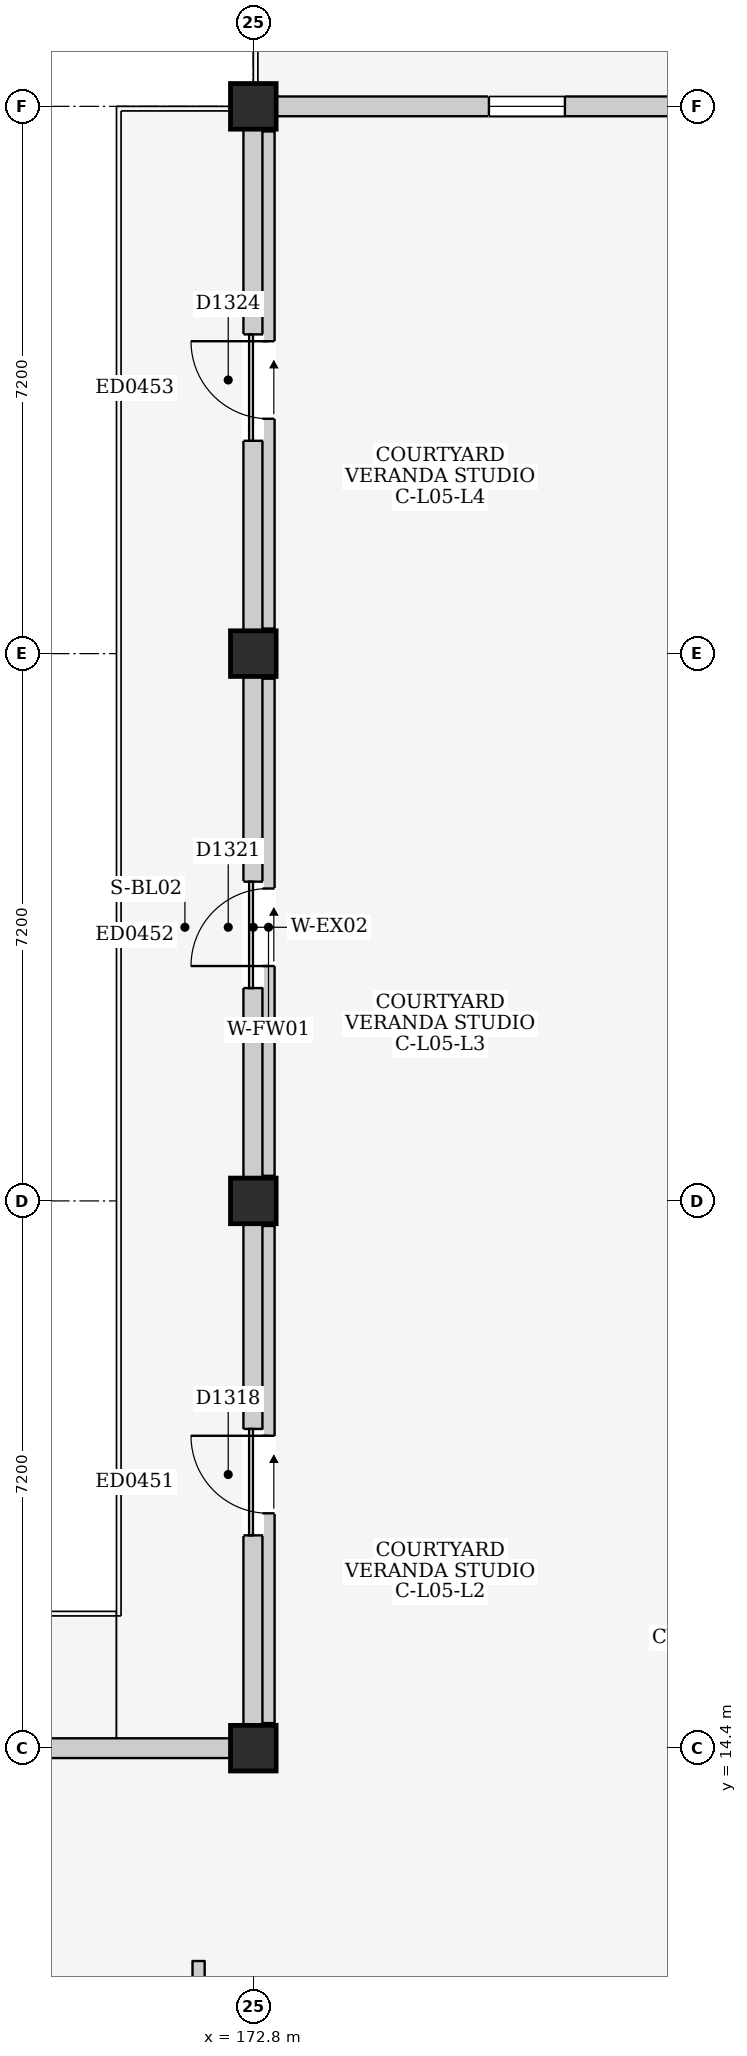
"""IFC4 building model, lengths in metres.
Left out: names, types, materials, properties, quantities, classifications, styles, units other than length and angle.
Written with IfcOpenShell. Run it as: python <this file> out.ifc"""

import sys

from ifc_helpers import new_model, si_unit, direction, frame, frame_2d, origin, origin_2d, place, context, subcontext, project, spatial, rectangle, extrude, element, fill, save


model = new_model("IFC4")
c1 = context("Model", 3, precision=1e-05, world=origin(), true_north=direction((0.0, 1.0)))
c2 = subcontext(c1, "Body", "Model", "MODEL_VIEW")
j1 = project(units=[si_unit("LENGTHUNIT", "METRE"), si_unit("PLANEANGLEUNIT", "RADIAN")], contexts=[c1])
p1 = place(None, origin())
s1 = spatial("IfcSite", under=j1, at=p1, CompositionType="ELEMENT")
p2 = place(p1, origin())
s2 = spatial("IfcBuilding", under=s1, at=p2, CompositionType="ELEMENT")
p3 = place(p2, frame((0.0, 0.0, 18.6)))
s3 = spatial("IfcBuildingStorey", under=s2, at=p3, CompositionType="ELEMENT", Elevation=18.6)
for number, where, z_axis, x_axis in (
    (1, (172.8, 14.4, 0.0), (0.0, 0.0, 1.0), (1.0, 0.0, 0.0)),
    (2, (172.8, 21.6, 0.0), (0.0, 0.0, 1.0), (1.0, 0.0, 0.0)),
    (3, (172.8, 28.8, 0.0), (0.0, 0.0, 1.0), (1.0, 0.0, 0.0)),
    (4, (172.8, 36.0, 0.0), (0.0, 0.0, 1.0), (1.0, 0.0, 0.0)),
):
    element("IfcColumn", number, at=place(p3, frame(where, z_axis=z_axis, x_axis=x_axis)), inside=s3, PredefinedType="COLUMN", context=c2, shape_type="SweptSolid", body=[
        extrude(rectangle(XDim=0.6, YDim=0.6, at=origin_2d()), origin(), (0.0, 0.0, 1.0), 3.3),
    ])
p4 = place(p3, frame((165.9, 14.4, 0.0), z_axis=(0.0, 0.0, 1.0), x_axis=(1.0, 0.0, 0.0)))
e5 = element("IfcWall", 5, at=p4, inside=s3, PredefinedType="ELEMENTEDWALL", context=c2, shape_type="SweptSolid", body=[
    extrude(rectangle(XDim=6.6, YDim=0.26, at=frame_2d((3.3, 0.0))), origin(), (0.0, 0.0, 1.0), 2.445),
])
p5 = place(p4, frame((2.8, 0.0, 1.2)))
e6 = element("IfcOpeningElement", 6, at=p5, cuts=e5, PredefinedType="OPENING", context=c2, shape_type="SweptSolid", body=[
    extrude(rectangle(XDim=1.0, YDim=0.9, at=frame_2d((0.5, 0.45))), frame((0.0, 0.145, 0.0), z_axis=(0.0, -1.0, 0.0), x_axis=(1.0, 0.0, 0.0)), (0.0, 0.0, 1.0), 0.29),
])
p6 = place(p3, frame((172.8, 14.7, 0.0), z_axis=(0.0, 0.0, 1.0), x_axis=(0.0, 1.0, 0.0)))
e7 = element("IfcWall", 7, at=p6, inside=s3, PredefinedType="ELEMENTEDWALL", context=c2, shape_type="SweptSolid", body=[
    extrude(rectangle(XDim=6.6, YDim=0.26, at=frame_2d((3.3, 0.0))), origin(), (0.0, 0.0, 1.0), 2.545),
])
p7 = place(p6, frame((2.5, 0.0, 0.0)))
e8 = element("IfcOpeningElement", 8, at=p7, cuts=e7, PredefinedType="OPENING", context=c2, shape_type="SweptSolid", body=[
    extrude(rectangle(XDim=1.4, YDim=2.1, at=frame_2d((0.7, 1.05))), frame((0.0, 0.145, 0.0), z_axis=(0.0, -1.0, 0.0), x_axis=(1.0, 0.0, 0.0)), (0.0, 0.0, 1.0), 0.29),
])
p8 = place(p3, frame((172.8, 21.9, 0.0), z_axis=(0.0, 0.0, 1.0), x_axis=(0.0, 1.0, 0.0)))
e9 = element("IfcWall", 9, at=p8, inside=s3, PredefinedType="ELEMENTEDWALL", context=c2, shape_type="SweptSolid", body=[
    extrude(rectangle(XDim=6.6, YDim=0.26, at=frame_2d((3.3, 0.0))), origin(), (0.0, 0.0, 1.0), 2.545),
])
p9 = place(p8, frame((2.5, 0.0, 0.0)))
e10 = element("IfcOpeningElement", 10, at=p9, cuts=e9, PredefinedType="OPENING", context=c2, shape_type="SweptSolid", body=[
    extrude(rectangle(XDim=1.4, YDim=2.1, at=frame_2d((0.7, 1.05))), frame((0.0, 0.145, 0.0), z_axis=(0.0, -1.0, 0.0), x_axis=(1.0, 0.0, 0.0)), (0.0, 0.0, 1.0), 0.29),
])
p10 = place(p3, frame((173.1, 36.0, 0.0), z_axis=(0.0, 0.0, 1.0), x_axis=(1.0, 0.0, 0.0)))
e11 = element("IfcWall", 11, at=p10, inside=s3, PredefinedType="ELEMENTEDWALL", context=c2, shape_type="SweptSolid", body=[
    extrude(rectangle(XDim=6.6, YDim=0.26, at=frame_2d((3.3, 0.0))), origin(), (0.0, 0.0, 1.0), 2.445),
])
p11 = place(p10, frame((2.8, 0.0, 1.1)))
e12 = element("IfcOpeningElement", 12, at=p11, cuts=e11, PredefinedType="OPENING", context=c2, shape_type="SweptSolid", body=[
    extrude(rectangle(XDim=1.0, YDim=0.9, at=frame_2d((0.5, 0.45))), frame((0.0, 0.145, 0.0), z_axis=(0.0, -1.0, 0.0), x_axis=(1.0, 0.0, 0.0)), (0.0, 0.0, 1.0), 0.29),
])
p12 = place(p3, frame((172.8, 29.1, 0.0), z_axis=(0.0, 0.0, 1.0), x_axis=(0.0, 1.0, 0.0)))
e13 = element("IfcWall", 13, at=p12, inside=s3, PredefinedType="ELEMENTEDWALL", context=c2, shape_type="SweptSolid", body=[
    extrude(rectangle(XDim=6.6, YDim=0.26, at=frame_2d((3.3, 0.0))), origin(), (0.0, 0.0, 1.0), 2.545),
])
p13 = place(p12, frame((2.5, 0.0, 0.0)))
e14 = element("IfcOpeningElement", 14, at=p13, cuts=e13, PredefinedType="OPENING", context=c2, shape_type="SweptSolid", body=[
    extrude(rectangle(XDim=1.4, YDim=2.1, at=frame_2d((0.7, 1.05))), frame((0.0, 0.145, 0.0), z_axis=(0.0, -1.0, 0.0), x_axis=(1.0, 0.0, 0.0)), (0.0, 0.0, 1.0), 0.29),
])
p14 = place(p3, frame((172.08, 7.28, 0.0), z_axis=(0.0, 0.0, 1.0), x_axis=(0.0, 1.0, 0.0)))
e15 = element("IfcWall", 15, at=p14, inside=s3, PredefinedType="PARTITIONING", context=c2, shape_type="SweptSolid", body=[
    extrude(rectangle(XDim=4.32, YDim=0.16, at=frame_2d((2.16, 0.0))), origin(), (0.0, 0.0, 1.0), 3.06),
])
p15 = place(p14, frame((0.72, 0.0, 0.0)))
e16 = element("IfcOpeningElement", 16, at=p15, cuts=e15, PredefinedType="OPENING", context=c2, shape_type="SweptSolid", body=[
    extrude(rectangle(XDim=1.2, YDim=2.2, at=frame_2d((0.6, 1.1))), frame((0.0, 0.095, 0.0), z_axis=(0.0, -1.0, 0.0), x_axis=(1.0, 0.0, 0.0)), (0.0, 0.0, 1.0), 0.19),
])
p16 = place(p3, frame((173.0, 14.73, 0.0), z_axis=(0.0, 0.0, 1.0), x_axis=(0.0, 1.0, 0.0)))
e17 = element("IfcWall", 17, at=p16, inside=s3, PredefinedType="PARTITIONING", context=c2, shape_type="SweptSolid", body=[
    extrude(rectangle(XDim=6.54, YDim=0.16, at=frame_2d((3.27, 0.0))), origin(), (0.0, 0.0, 1.0), 3.06),
])
p17 = place(p16, frame((2.76, 0.0, 0.0)))
e18 = element("IfcOpeningElement", 18, at=p17, cuts=e17, PredefinedType="OPENING", context=c2, shape_type="SweptSolid", body=[
    extrude(rectangle(XDim=1.02, YDim=2.18, at=frame_2d((0.51, 1.09))), frame((0.0, 0.095, 0.0), z_axis=(0.0, -1.0, 0.0), x_axis=(1.0, 0.0, 0.0)), (0.0, 0.0, 1.0), 0.19),
])
p18 = place(p3, frame((173.0, 21.93, 0.0), z_axis=(0.0, 0.0, 1.0), x_axis=(0.0, 1.0, 0.0)))
e19 = element("IfcWall", 19, at=p18, inside=s3, PredefinedType="PARTITIONING", context=c2, shape_type="SweptSolid", body=[
    extrude(rectangle(XDim=6.54, YDim=0.16, at=frame_2d((3.27, 0.0))), origin(), (0.0, 0.0, 1.0), 3.06),
])
p19 = place(p18, frame((2.76, 0.0, 0.0)))
e20 = element("IfcOpeningElement", 20, at=p19, cuts=e19, PredefinedType="OPENING", context=c2, shape_type="SweptSolid", body=[
    extrude(rectangle(XDim=1.02, YDim=2.18, at=frame_2d((0.51, 1.09))), frame((0.0, 0.095, 0.0), z_axis=(0.0, -1.0, 0.0), x_axis=(1.0, 0.0, 0.0)), (0.0, 0.0, 1.0), 0.19),
])
p20 = place(p3, frame((173.0, 29.13, 0.0), z_axis=(0.0, 0.0, 1.0), x_axis=(0.0, 1.0, 0.0)))
e21 = element("IfcWall", 21, at=p20, inside=s3, PredefinedType="PARTITIONING", context=c2, shape_type="SweptSolid", body=[
    extrude(rectangle(XDim=6.54, YDim=0.16, at=frame_2d((3.27, 0.0))), origin(), (0.0, 0.0, 1.0), 3.06),
])
p21 = place(p20, frame((2.76, 0.0, 0.0)))
e22 = element("IfcOpeningElement", 22, at=p21, cuts=e21, PredefinedType="OPENING", context=c2, shape_type="SweptSolid", body=[
    extrude(rectangle(XDim=1.02, YDim=2.18, at=frame_2d((0.51, 1.09))), frame((0.0, 0.095, 0.0), z_axis=(0.0, -1.0, 0.0), x_axis=(1.0, 0.0, 0.0)), (0.0, 0.0, 1.0), 0.19),
])
p22 = place(p7, frame((1.4, 0.0, 0.0), z_axis=(0.0, 0.0, 1.0), x_axis=(-1.0, 0.0, 0.0)))
e23 = element("IfcDoor", 23, at=p22, inside=s3, OperationType="SLIDING_TO_RIGHT", PredefinedType="DOOR", context=c2, shape_type="SweptSolid", body=[
    extrude(rectangle(XDim=1.4, YDim=2.1, at=frame_2d((0.7, 1.05))), frame((0.0, 0.025, 0.0), z_axis=(0.0, -1.0, 0.0), x_axis=(1.0, 0.0, 0.0)), (0.0, 0.0, 1.0), 0.05),
])
fill(e8, e23)
p23 = place(p9, frame((1.4, 0.0, 0.0), z_axis=(0.0, 0.0, 1.0), x_axis=(-1.0, 0.0, 0.0)))
e24 = element("IfcDoor", 24, at=p23, inside=s3, OperationType="SLIDING_TO_RIGHT", PredefinedType="DOOR", context=c2, shape_type="SweptSolid", body=[
    extrude(rectangle(XDim=1.4, YDim=2.1, at=frame_2d((0.7, 1.05))), frame((0.0, 0.025, 0.0), z_axis=(0.0, -1.0, 0.0), x_axis=(1.0, 0.0, 0.0)), (0.0, 0.0, 1.0), 0.05),
])
fill(e10, e24)
p24 = place(p11, origin())
e25 = element("IfcWindow", 25, at=p24, inside=s3, PartitioningType="SINGLE_PANEL", PredefinedType="WINDOW", context=c2, shape_type="SweptSolid", body=[
    extrude(rectangle(XDim=1.0, YDim=0.9, at=frame_2d((0.5, 0.45))), frame((0.0, 0.03, 0.0), z_axis=(0.0, -1.0, 0.0), x_axis=(1.0, 0.0, 0.0)), (0.0, 0.0, 1.0), 0.06),
])
fill(e12, e25)
p25 = place(p13, frame((1.4, 0.0, 0.0), z_axis=(0.0, 0.0, 1.0), x_axis=(-1.0, 0.0, 0.0)))
e26 = element("IfcDoor", 26, at=p25, inside=s3, OperationType="SLIDING_TO_RIGHT", PredefinedType="DOOR", context=c2, shape_type="SweptSolid", body=[
    extrude(rectangle(XDim=1.4, YDim=2.1, at=frame_2d((0.7, 1.05))), frame((0.0, 0.025, 0.0), z_axis=(0.0, -1.0, 0.0), x_axis=(1.0, 0.0, 0.0)), (0.0, 0.0, 1.0), 0.05),
])
fill(e14, e26)
p26 = place(p17, origin())
e27 = element("IfcDoor", 27, at=p26, inside=s3, OperationType="SINGLE_SWING_RIGHT", PredefinedType="DOOR", context=c2, shape_type="SweptSolid", body=[
    extrude(rectangle(XDim=1.02, YDim=2.18, at=frame_2d((0.51, 1.09))), frame((0.0, 0.025, 0.0), z_axis=(0.0, -1.0, 0.0), x_axis=(1.0, 0.0, 0.0)), (0.0, 0.0, 1.0), 0.05),
])
fill(e18, e27)
p27 = place(p19, origin())
e28 = element("IfcDoor", 28, at=p27, inside=s3, OperationType="SINGLE_SWING_LEFT", PredefinedType="DOOR", context=c2, shape_type="SweptSolid", body=[
    extrude(rectangle(XDim=1.02, YDim=2.18, at=frame_2d((0.51, 1.09))), frame((0.0, 0.025, 0.0), z_axis=(0.0, -1.0, 0.0), x_axis=(1.0, 0.0, 0.0)), (0.0, 0.0, 1.0), 0.05),
])
fill(e20, e28)
p28 = place(p21, origin())
e29 = element("IfcDoor", 29, at=p28, inside=s3, OperationType="SINGLE_SWING_RIGHT", PredefinedType="DOOR", context=c2, shape_type="SweptSolid", body=[
    extrude(rectangle(XDim=1.02, YDim=2.18, at=frame_2d((0.51, 1.09))), frame((0.0, 0.025, 0.0), z_axis=(0.0, -1.0, 0.0), x_axis=(1.0, 0.0, 0.0)), (0.0, 0.0, 1.0), 0.05),
])
fill(e22, e29)
save(model, sys.argv[1])
